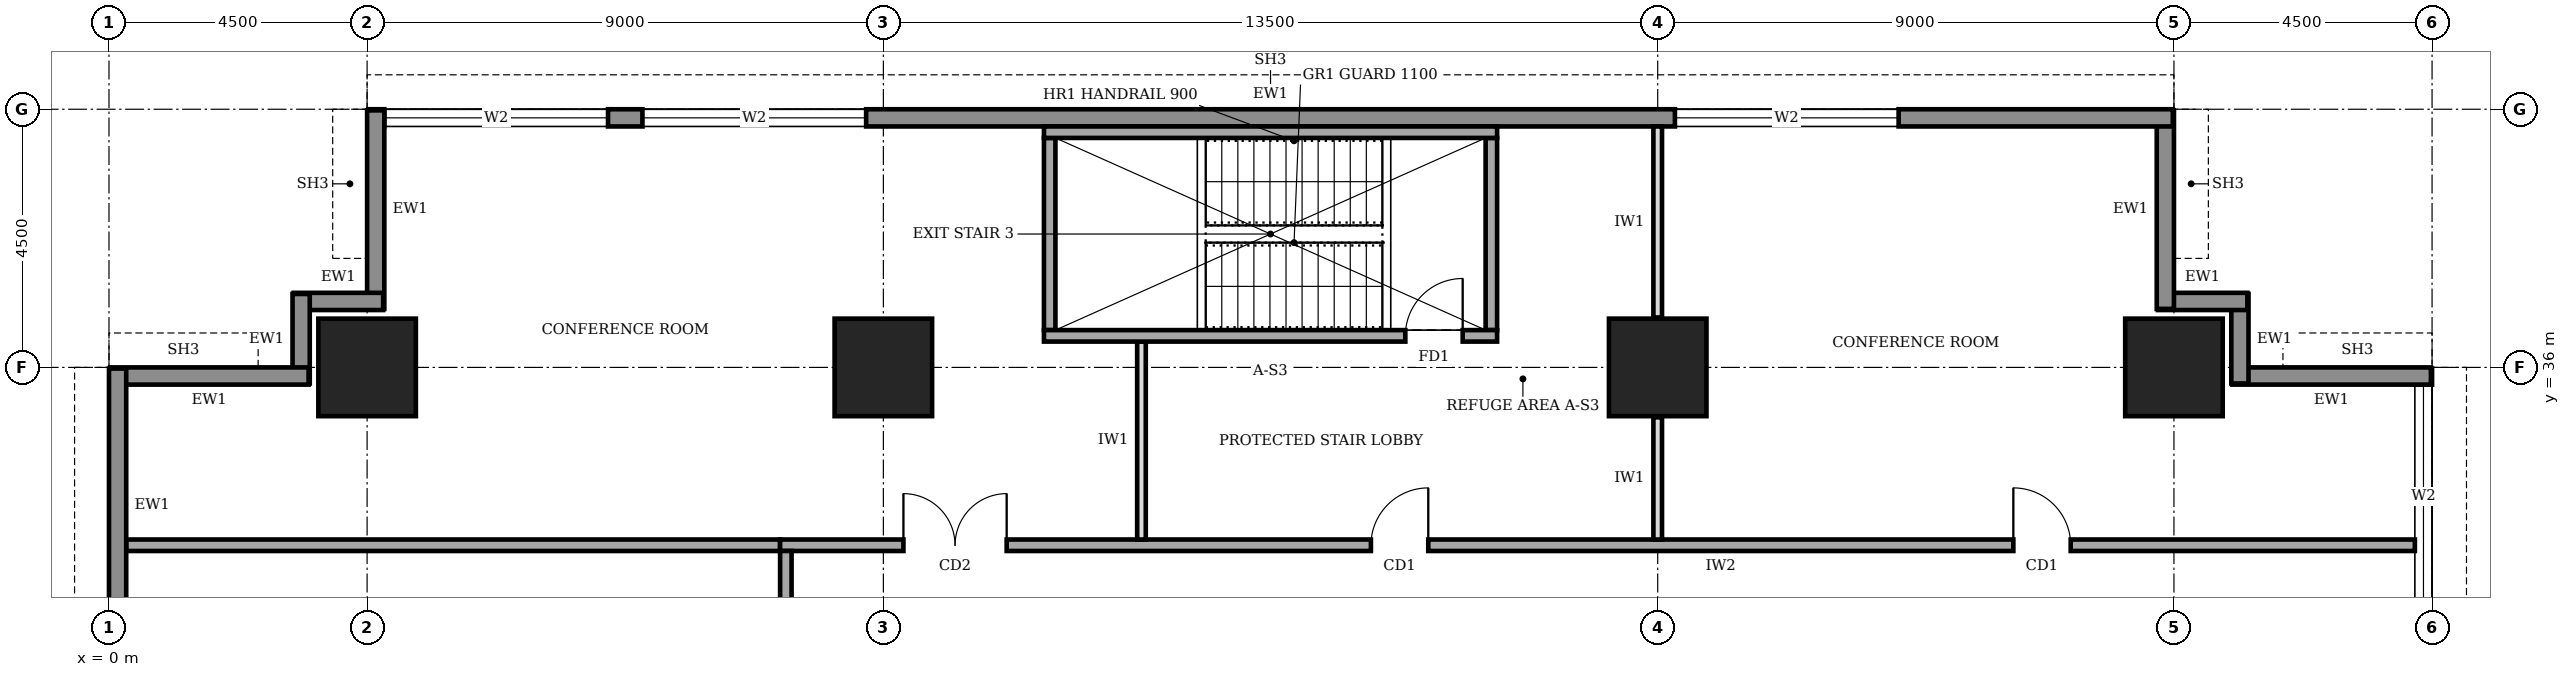
"""IFC4 building model, lengths in metres.
Left out: names, types, materials, properties, quantities, classifications, styles, units other than length and angle.
Written with IfcOpenShell. Run it as: python <this file> out.ifc"""

import sys

from ifc_helpers import new_model, si_unit, direction, frame, frame_2d, origin, origin_2d, place, context, subcontext, project, spatial, rectangle, extrude, element, fill, save


model = new_model("IFC4")
c1 = context("Model", 3, precision=1e-05, world=origin(), true_north=direction((0.0, 1.0)))
c2 = subcontext(c1, "Body", "Model", "MODEL_VIEW")
j1 = project(units=[si_unit("LENGTHUNIT", "METRE"), si_unit("PLANEANGLEUNIT", "RADIAN")], contexts=[c1])
p1 = place(None, origin())
s1 = spatial("IfcSite", under=j1, at=p1, CompositionType="ELEMENT")
p2 = place(p1, origin())
s2 = spatial("IfcBuilding", under=s1, at=p2, CompositionType="ELEMENT")
p3 = place(p2, frame((0.0, 0.0, 157.0)))
s3 = spatial("IfcBuildingStorey", under=s2, at=p3, CompositionType="ELEMENT", Elevation=157.0)
for number, where, z_axis, x_axis in (
    (1, (4.5, 36.0, 0.0), (0.0, 0.0, 1.0), (1.0, 0.0, 0.0)),
    (2, (13.5, 36.0, 0.0), (0.0, 0.0, 1.0), (1.0, 0.0, 0.0)),
    (3, (27.0, 36.0, 0.0), (0.0, 0.0, 1.0), (1.0, 0.0, 0.0)),
    (4, (36.0, 36.0, 0.0), (0.0, 0.0, 1.0), (1.0, 0.0, 0.0)),
):
    element("IfcColumn", number, at=place(p3, frame(where, z_axis=z_axis, x_axis=x_axis)), inside=s3, PredefinedType="COLUMN", context=c2, shape_type="SweptSolid", body=[
        extrude(rectangle(XDim=1.7, YDim=1.7, at=origin_2d()), origin(), (0.0, 0.0, 1.0), 4.0),
    ])
p4 = place(p3, frame((40.35, 4.52, 0.0), z_axis=(0.0, 0.0, 1.0), x_axis=(0.0, 1.0, 0.0)))
e5 = element("IfcWall", 5, at=p4, inside=s3, PredefinedType="STANDARD", context=c2, shape_type="SweptSolid", body=[
    extrude(rectangle(XDim=31.46, YDim=0.3, at=frame_2d((15.73, 0.0))), origin(), (0.0, 0.0, 1.0), 3.75),
])
p5 = place(p4, frame((4.78, 0.0, 0.6)))
e6 = element("IfcOpeningElement", 6, at=p5, cuts=e5, PredefinedType="OPENING", context=c2, shape_type="SweptSolid", body=[
    extrude(rectangle(XDim=3.9, YDim=2.6, at=frame_2d((1.95, 1.3))), frame((0.0, 0.16, 0.0), z_axis=(0.0, -1.0, 0.0), x_axis=(1.0, 0.0, 0.0)), (0.0, 0.0, 1.0), 0.32),
])
p6 = place(p4, frame((9.28, 0.0, 0.6)))
e7 = element("IfcOpeningElement", 7, at=p6, cuts=e5, PredefinedType="OPENING", context=c2, shape_type="SweptSolid", body=[
    extrude(rectangle(XDim=3.9, YDim=2.6, at=frame_2d((1.95, 1.3))), frame((0.0, 0.16, 0.0), z_axis=(0.0, -1.0, 0.0), x_axis=(1.0, 0.0, 0.0)), (0.0, 0.0, 1.0), 0.32),
])
p7 = place(p4, frame((13.78, 0.0, 0.6)))
e8 = element("IfcOpeningElement", 8, at=p7, cuts=e5, PredefinedType="OPENING", context=c2, shape_type="SweptSolid", body=[
    extrude(rectangle(XDim=3.9, YDim=2.6, at=frame_2d((1.95, 1.3))), frame((0.0, 0.16, 0.0), z_axis=(0.0, -1.0, 0.0), x_axis=(1.0, 0.0, 0.0)), (0.0, 0.0, 1.0), 0.32),
])
p8 = place(p4, frame((18.28, 0.0, 0.6)))
e9 = element("IfcOpeningElement", 9, at=p8, cuts=e5, PredefinedType="OPENING", context=c2, shape_type="SweptSolid", body=[
    extrude(rectangle(XDim=3.9, YDim=2.6, at=frame_2d((1.95, 1.3))), frame((0.0, 0.16, 0.0), z_axis=(0.0, -1.0, 0.0), x_axis=(1.0, 0.0, 0.0)), (0.0, 0.0, 1.0), 0.32),
])
p9 = place(p4, frame((22.78, 0.0, 0.6)))
e10 = element("IfcOpeningElement", 10, at=p9, cuts=e5, PredefinedType="OPENING", context=c2, shape_type="SweptSolid", body=[
    extrude(rectangle(XDim=3.9, YDim=2.6, at=frame_2d((1.95, 1.3))), frame((0.0, 0.16, 0.0), z_axis=(0.0, -1.0, 0.0), x_axis=(1.0, 0.0, 0.0)), (0.0, 0.0, 1.0), 0.32),
])
p10 = place(p4, frame((27.28, 0.0, 0.6)))
e11 = element("IfcOpeningElement", 11, at=p10, cuts=e5, PredefinedType="OPENING", context=c2, shape_type="SweptSolid", body=[
    extrude(rectangle(XDim=3.9, YDim=2.6, at=frame_2d((1.95, 1.3))), frame((0.0, 0.16, 0.0), z_axis=(0.0, -1.0, 0.0), x_axis=(1.0, 0.0, 0.0)), (0.0, 0.0, 1.0), 0.32),
])
p11 = place(p3, frame((40.48, 35.85, 0.0), z_axis=(0.0, 0.0, 1.0), x_axis=(-1.0, 0.0, 0.0)))
e12 = element("IfcWall", 12, at=p11, inside=s3, PredefinedType="STANDARD", context=c2, shape_type="SweptSolid", body=[
    extrude(rectangle(XDim=3.46, YDim=0.3, at=frame_2d((1.73, 0.0))), origin(), (0.0, 0.0, 1.0), 2.85),
])
for number, where, z_axis, x_axis in (
    (13, (37.15, 35.72, 0.0), (0.0, 0.0, 1.0), (0.0, 1.0, 0.0)),
    (14, (37.28, 37.15, 0.0), (0.0, 0.0, 1.0), (-1.0, 0.0, 0.0)),
):
    element("IfcWall", number, at=place(p3, frame(where, z_axis=z_axis, x_axis=x_axis)), inside=s3, PredefinedType="STANDARD", context=c2, shape_type="SweptSolid", body=[
        extrude(rectangle(XDim=1.56, YDim=0.3, at=frame_2d((0.78, 0.0))), origin(), (0.0, 0.0, 1.0), 3.75),
    ])
p12 = place(p3, frame((35.85, 37.02, 0.0), z_axis=(0.0, 0.0, 1.0), x_axis=(0.0, 1.0, 0.0)))
e15 = element("IfcWall", 15, at=p12, inside=s3, PredefinedType="STANDARD", context=c2, shape_type="SweptSolid", body=[
    extrude(rectangle(XDim=3.46, YDim=0.3, at=frame_2d((1.73, 0.0))), origin(), (0.0, 0.0, 1.0), 2.85),
])
p13 = place(p3, frame((35.98, 40.35, 0.0), z_axis=(0.0, 0.0, 1.0), x_axis=(-1.0, 0.0, 0.0)))
e16 = element("IfcWall", 16, at=p13, inside=s3, PredefinedType="STANDARD", context=c2, shape_type="SweptSolid", body=[
    extrude(rectangle(XDim=31.46, YDim=0.3, at=frame_2d((15.73, 0.0))), origin(), (0.0, 0.0, 1.0), 3.75),
])
p14 = place(p13, frame((27.28, 0.0, 0.6)))
e17 = element("IfcOpeningElement", 17, at=p14, cuts=e16, PredefinedType="OPENING", context=c2, shape_type="SweptSolid", body=[
    extrude(rectangle(XDim=3.9, YDim=2.6, at=frame_2d((1.95, 1.3))), frame((0.0, 0.16, 0.0), z_axis=(0.0, -1.0, 0.0), x_axis=(1.0, 0.0, 0.0)), (0.0, 0.0, 1.0), 0.32),
])
p15 = place(p13, frame((22.78, 0.0, 0.6)))
e18 = element("IfcOpeningElement", 18, at=p15, cuts=e16, PredefinedType="OPENING", context=c2, shape_type="SweptSolid", body=[
    extrude(rectangle(XDim=3.9, YDim=2.6, at=frame_2d((1.95, 1.3))), frame((0.0, 0.16, 0.0), z_axis=(0.0, -1.0, 0.0), x_axis=(1.0, 0.0, 0.0)), (0.0, 0.0, 1.0), 0.32),
])
p16 = place(p13, frame((4.78, 0.0, 0.6)))
e19 = element("IfcOpeningElement", 19, at=p16, cuts=e16, PredefinedType="OPENING", context=c2, shape_type="SweptSolid", body=[
    extrude(rectangle(XDim=3.9, YDim=2.6, at=frame_2d((1.95, 1.3))), frame((0.0, 0.16, 0.0), z_axis=(0.0, -1.0, 0.0), x_axis=(1.0, 0.0, 0.0)), (0.0, 0.0, 1.0), 0.32),
])
p17 = place(p3, frame((4.65, 40.48, 0.0), z_axis=(0.0, 0.0, 1.0), x_axis=(0.0, -1.0, 0.0)))
e20 = element("IfcWall", 20, at=p17, inside=s3, PredefinedType="STANDARD", context=c2, shape_type="SweptSolid", body=[
    extrude(rectangle(XDim=3.46, YDim=0.3, at=frame_2d((1.73, 0.0))), origin(), (0.0, 0.0, 1.0), 2.85),
])
for number, where, z_axis, x_axis in (
    (21, (4.78, 37.15, 0.0), (0.0, 0.0, 1.0), (-1.0, 0.0, 0.0)),
    (22, (3.35, 37.28, 0.0), (0.0, 0.0, 1.0), (0.0, -1.0, 0.0)),
):
    element("IfcWall", number, at=place(p3, frame(where, z_axis=z_axis, x_axis=x_axis)), inside=s3, PredefinedType="STANDARD", context=c2, shape_type="SweptSolid", body=[
        extrude(rectangle(XDim=1.56, YDim=0.3, at=frame_2d((0.78, 0.0))), origin(), (0.0, 0.0, 1.0), 3.75),
    ])
p18 = place(p3, frame((3.48, 35.85, 0.0), z_axis=(0.0, 0.0, 1.0), x_axis=(-1.0, 0.0, 0.0)))
e23 = element("IfcWall", 23, at=p18, inside=s3, PredefinedType="STANDARD", context=c2, shape_type="SweptSolid", body=[
    extrude(rectangle(XDim=3.46, YDim=0.3, at=frame_2d((1.73, 0.0))), origin(), (0.0, 0.0, 1.0), 2.85),
])
p19 = place(p3, frame((0.15, 35.98, 0.0), z_axis=(0.0, 0.0, 1.0), x_axis=(0.0, -1.0, 0.0)))
e24 = element("IfcWall", 24, at=p19, inside=s3, PredefinedType="STANDARD", context=c2, shape_type="SweptSolid", body=[
    extrude(rectangle(XDim=31.46, YDim=0.3, at=frame_2d((15.73, 0.0))), origin(), (0.0, 0.0, 1.0), 3.75),
])
p20 = place(p19, frame((27.28, 0.0, 0.6)))
e25 = element("IfcOpeningElement", 25, at=p20, cuts=e24, PredefinedType="OPENING", context=c2, shape_type="SweptSolid", body=[
    extrude(rectangle(XDim=3.9, YDim=2.6, at=frame_2d((1.95, 1.3))), frame((0.0, 0.16, 0.0), z_axis=(0.0, -1.0, 0.0), x_axis=(1.0, 0.0, 0.0)), (0.0, 0.0, 1.0), 0.32),
])
p21 = place(p19, frame((22.78, 0.0, 0.6)))
e26 = element("IfcOpeningElement", 26, at=p21, cuts=e24, PredefinedType="OPENING", context=c2, shape_type="SweptSolid", body=[
    extrude(rectangle(XDim=3.9, YDim=2.6, at=frame_2d((1.95, 1.3))), frame((0.0, 0.16, 0.0), z_axis=(0.0, -1.0, 0.0), x_axis=(1.0, 0.0, 0.0)), (0.0, 0.0, 1.0), 0.32),
])
p22 = place(p19, frame((18.28, 0.0, 0.6)))
e27 = element("IfcOpeningElement", 27, at=p22, cuts=e24, PredefinedType="OPENING", context=c2, shape_type="SweptSolid", body=[
    extrude(rectangle(XDim=3.9, YDim=2.6, at=frame_2d((1.95, 1.3))), frame((0.0, 0.16, 0.0), z_axis=(0.0, -1.0, 0.0), x_axis=(1.0, 0.0, 0.0)), (0.0, 0.0, 1.0), 0.32),
])
p23 = place(p19, frame((13.78, 0.0, 0.6)))
e28 = element("IfcOpeningElement", 28, at=p23, cuts=e24, PredefinedType="OPENING", context=c2, shape_type="SweptSolid", body=[
    extrude(rectangle(XDim=3.9, YDim=2.6, at=frame_2d((1.95, 1.3))), frame((0.0, 0.16, 0.0), z_axis=(0.0, -1.0, 0.0), x_axis=(1.0, 0.0, 0.0)), (0.0, 0.0, 1.0), 0.32),
])
p24 = place(p19, frame((9.28, 0.0, 0.6)))
e29 = element("IfcOpeningElement", 29, at=p24, cuts=e24, PredefinedType="OPENING", context=c2, shape_type="SweptSolid", body=[
    extrude(rectangle(XDim=3.9, YDim=2.6, at=frame_2d((1.95, 1.3))), frame((0.0, 0.16, 0.0), z_axis=(0.0, -1.0, 0.0), x_axis=(1.0, 0.0, 0.0)), (0.0, 0.0, 1.0), 0.32),
])
p25 = place(p19, frame((4.78, 0.0, 0.6)))
e30 = element("IfcOpeningElement", 30, at=p25, cuts=e24, PredefinedType="OPENING", context=c2, shape_type="SweptSolid", body=[
    extrude(rectangle(XDim=3.9, YDim=2.6, at=frame_2d((1.95, 1.3))), frame((0.0, 0.16, 0.0), z_axis=(0.0, -1.0, 0.0), x_axis=(1.0, 0.0, 0.0)), (0.0, 0.0, 1.0), 0.32),
])
p26 = place(p3, frame((40.2, 32.9, 0.0), z_axis=(0.0, 0.0, 1.0), x_axis=(-1.0, 0.0, 0.0)))
e31 = element("IfcWall", 31, at=p26, inside=s3, PredefinedType="SOLIDWALL", context=c2, shape_type="SweptSolid", body=[
    extrude(rectangle(XDim=28.5, YDim=0.2, at=frame_2d((14.25, 0.0))), origin(), (0.0, 0.0, 1.0), 3.75),
])
p27 = place(p26, frame((24.55, 0.0, 0.0)))
e32 = element("IfcOpeningElement", 32, at=p27, cuts=e31, PredefinedType="OPENING", context=c2, shape_type="SweptSolid", body=[
    extrude(rectangle(XDim=1.8, YDim=2.1, at=frame_2d((0.9, 1.05))), frame((0.0, 0.11, 0.0), z_axis=(0.0, -1.0, 0.0), x_axis=(1.0, 0.0, 0.0)), (0.0, 0.0, 1.0), 0.22),
])
p28 = place(p26, frame((17.2, 0.0, 0.0)))
e33 = element("IfcOpeningElement", 33, at=p28, cuts=e31, PredefinedType="OPENING", context=c2, shape_type="SweptSolid", body=[
    extrude(rectangle(XDim=1.0, YDim=2.1, at=frame_2d((0.5, 1.05))), frame((0.0, 0.11, 0.0), z_axis=(0.0, -1.0, 0.0), x_axis=(1.0, 0.0, 0.0)), (0.0, 0.0, 1.0), 0.22),
])
p29 = place(p26, frame((6.0, 0.0, 0.0)))
e34 = element("IfcOpeningElement", 34, at=p29, cuts=e31, PredefinedType="OPENING", context=c2, shape_type="SweptSolid", body=[
    extrude(rectangle(XDim=1.0, YDim=2.1, at=frame_2d((0.5, 1.05))), frame((0.0, 0.11, 0.0), z_axis=(0.0, -1.0, 0.0), x_axis=(1.0, 0.0, 0.0)), (0.0, 0.0, 1.0), 0.22),
])
p30 = place(p3, frame((11.8, 32.8, 0.0), z_axis=(0.0, 0.0, 1.0), x_axis=(0.0, -1.0, 0.0)))
e35 = element("IfcWall", 35, at=p30, inside=s3, PredefinedType="SOLIDWALL", context=c2, shape_type="SweptSolid", body=[
    extrude(rectangle(XDim=25.3, YDim=0.2, at=frame_2d((12.65, 0.0))), origin(), (0.0, 0.0, 1.0), 3.75),
])
p31 = place(p30, frame((21.8, 0.0, 0.0)))
e36 = element("IfcOpeningElement", 36, at=p31, cuts=e35, PredefinedType="OPENING", context=c2, shape_type="SweptSolid", body=[
    extrude(rectangle(XDim=1.0, YDim=2.1, at=frame_2d((0.5, 1.05))), frame((0.0, 0.11, 0.0), z_axis=(0.0, -1.0, 0.0), x_axis=(1.0, 0.0, 0.0)), (0.0, 0.0, 1.0), 0.22),
])
p32 = place(p30, frame((17.7, 0.0, 0.0)))
e37 = element("IfcOpeningElement", 37, at=p32, cuts=e35, PredefinedType="OPENING", context=c2, shape_type="SweptSolid", body=[
    extrude(rectangle(XDim=1.0, YDim=2.1, at=frame_2d((0.5, 1.05))), frame((0.0, 0.11, 0.0), z_axis=(0.0, -1.0, 0.0), x_axis=(1.0, 0.0, 0.0)), (0.0, 0.0, 1.0), 0.22),
])
p33 = place(p30, frame((14.7, 0.0, 0.0)))
e38 = element("IfcOpeningElement", 38, at=p33, cuts=e35, PredefinedType="OPENING", context=c2, shape_type="SweptSolid", body=[
    extrude(rectangle(XDim=0.9, YDim=2.1, at=frame_2d((0.45, 1.05))), frame((0.0, 0.11, 0.0), z_axis=(0.0, -1.0, 0.0), x_axis=(1.0, 0.0, 0.0)), (0.0, 0.0, 1.0), 0.22),
])
p34 = place(p30, frame((11.65, 0.0, 0.0)))
e39 = element("IfcOpeningElement", 39, at=p34, cuts=e35, PredefinedType="OPENING", context=c2, shape_type="SweptSolid", body=[
    extrude(rectangle(XDim=0.9, YDim=2.1, at=frame_2d((0.45, 1.05))), frame((0.0, 0.11, 0.0), z_axis=(0.0, -1.0, 0.0), x_axis=(1.0, 0.0, 0.0)), (0.0, 0.0, 1.0), 0.22),
])
p35 = place(p30, frame((6.95, 0.0, 0.0)))
e40 = element("IfcOpeningElement", 40, at=p35, cuts=e35, PredefinedType="OPENING", context=c2, shape_type="SweptSolid", body=[
    extrude(rectangle(XDim=0.9, YDim=2.1, at=frame_2d((0.45, 1.05))), frame((0.0, 0.11, 0.0), z_axis=(0.0, -1.0, 0.0), x_axis=(1.0, 0.0, 0.0)), (0.0, 0.0, 1.0), 0.22),
])
p36 = place(p30, frame((9.5, 0.0, 0.0)))
e41 = element("IfcOpeningElement", 41, at=p36, cuts=e35, PredefinedType="OPENING", context=c2, shape_type="SweptSolid", body=[
    extrude(rectangle(XDim=1.0, YDim=2.1, at=frame_2d((0.5, 1.05))), frame((0.0, 0.11, 0.0), z_axis=(0.0, -1.0, 0.0), x_axis=(1.0, 0.0, 0.0)), (0.0, 0.0, 1.0), 0.22),
])
p37 = place(p30, frame((2.3, 0.0, 0.0)))
e42 = element("IfcOpeningElement", 42, at=p37, cuts=e35, PredefinedType="OPENING", context=c2, shape_type="SweptSolid", body=[
    extrude(rectangle(XDim=1.0, YDim=2.1, at=frame_2d((0.5, 1.05))), frame((0.0, 0.11, 0.0), z_axis=(0.0, -1.0, 0.0), x_axis=(1.0, 0.0, 0.0)), (0.0, 0.0, 1.0), 0.22),
])
p38 = place(p3, frame((0.3, 32.9, 0.0), z_axis=(0.0, 0.0, 1.0), x_axis=(1.0, 0.0, 0.0)))
e43 = element("IfcWall", 43, at=p38, inside=s3, PredefinedType="SOLIDWALL", context=c2, shape_type="SweptSolid", body=[
    extrude(rectangle(XDim=11.4, YDim=0.2, at=frame_2d((5.7, 0.0))), origin(), (0.0, 0.0, 1.0), 3.75),
])
p39 = place(p3, frame((18.0, 33.0, 0.0), z_axis=(0.0, 0.0, 1.0), x_axis=(0.0, 1.0, 0.0)))
e44 = element("IfcWall", 44, at=p39, inside=s3, PredefinedType="PARTITIONING", context=c2, shape_type="SweptSolid", body=[
    extrude(rectangle(XDim=3.45, YDim=0.15, at=frame_2d((1.725, 0.0))), origin(), (0.0, 0.0, 1.0), 3.75),
])
p40 = place(p3, frame((27.0, 33.0, 0.0), z_axis=(0.0, 0.0, 1.0), x_axis=(0.0, 1.0, 0.0)))
e45 = element("IfcWall", 45, at=p40, inside=s3, PredefinedType="PARTITIONING", context=c2, shape_type="SweptSolid", body=[
    extrude(rectangle(XDim=2.13, YDim=0.15, at=frame_2d((1.065, 0.0))), origin(), (0.0, 0.0, 1.0), 2.85),
])
p41 = place(p3, frame((27.0, 36.87, 0.0), z_axis=(0.0, 0.0, 1.0), x_axis=(0.0, 1.0, 0.0)))
e46 = element("IfcWall", 46, at=p41, inside=s3, PredefinedType="PARTITIONING", context=c2, shape_type="SweptSolid", body=[
    extrude(rectangle(XDim=3.33, YDim=0.15, at=frame_2d((1.665, 0.0))), origin(), (0.0, 0.0, 1.0), 2.85),
])
p42 = place(p3, frame((16.3, 36.55, 0.0), z_axis=(0.0, 0.0, 1.0), x_axis=(1.0, 0.0, 0.0)))
e47 = element("IfcWall", 47, at=p42, inside=s3, PredefinedType="SOLIDWALL", context=c2, shape_type="SweptSolid", body=[
    extrude(rectangle(XDim=7.9, YDim=0.2, at=frame_2d((3.95, 0.0))), origin(), (0.0, 0.0, 1.0), 3.75),
])
p43 = place(p42, frame((6.3, 0.0, 0.0)))
e48 = element("IfcOpeningElement", 48, at=p43, cuts=e47, PredefinedType="OPENING", context=c2, shape_type="SweptSolid", body=[
    extrude(rectangle(XDim=1.0, YDim=2.1, at=frame_2d((0.5, 1.05))), frame((0.0, 0.11, 0.0), z_axis=(0.0, -1.0, 0.0), x_axis=(1.0, 0.0, 0.0)), (0.0, 0.0, 1.0), 0.22),
])
p44 = place(p3, frame((16.3, 40.1, 0.0), z_axis=(0.0, 0.0, 1.0), x_axis=(1.0, 0.0, 0.0)))
e49 = element("IfcWall", 49, at=p44, inside=s3, PredefinedType="SOLIDWALL", context=c2, shape_type="SweptSolid", body=[
    extrude(rectangle(XDim=7.9, YDim=0.2, at=frame_2d((3.95, 0.0))), origin(), (0.0, 0.0, 1.0), 3.75),
])
for number, where, z_axis, x_axis in (
    (50, (16.4, 36.65, 0.0), (0.0, 0.0, 1.0), (0.0, 1.0, 0.0)),
    (51, (24.1, 36.65, 0.0), (0.0, 0.0, 1.0), (0.0, 1.0, 0.0)),
):
    element("IfcWall", number, at=place(p3, frame(where, z_axis=z_axis, x_axis=x_axis)), inside=s3, PredefinedType="SOLIDWALL", context=c2, shape_type="SweptSolid", body=[
        extrude(rectangle(XDim=3.35, YDim=0.2, at=frame_2d((1.675, 0.0))), origin(), (0.0, 0.0, 1.0), 3.75),
    ])
p45 = place(p10, origin())
e52 = element("IfcWindow", 52, at=p45, inside=s3, PartitioningType="SINGLE_PANEL", PredefinedType="WINDOW", context=c2, shape_type="SweptSolid", body=[
    extrude(rectangle(XDim=3.9, YDim=2.6, at=frame_2d((1.95, 1.3))), frame((0.0, 0.03, 0.0), z_axis=(0.0, -1.0, 0.0), x_axis=(1.0, 0.0, 0.0)), (0.0, 0.0, 1.0), 0.06),
])
fill(e11, e52)
p46 = place(p14, origin())
e53 = element("IfcWindow", 53, at=p46, inside=s3, PartitioningType="SINGLE_PANEL", PredefinedType="WINDOW", context=c2, shape_type="SweptSolid", body=[
    extrude(rectangle(XDim=3.9, YDim=2.6, at=frame_2d((1.95, 1.3))), frame((0.0, 0.03, 0.0), z_axis=(0.0, -1.0, 0.0), x_axis=(1.0, 0.0, 0.0)), (0.0, 0.0, 1.0), 0.06),
])
fill(e17, e53)
p47 = place(p15, origin())
e54 = element("IfcWindow", 54, at=p47, inside=s3, PartitioningType="SINGLE_PANEL", PredefinedType="WINDOW", context=c2, shape_type="SweptSolid", body=[
    extrude(rectangle(XDim=3.9, YDim=2.6, at=frame_2d((1.95, 1.3))), frame((0.0, 0.03, 0.0), z_axis=(0.0, -1.0, 0.0), x_axis=(1.0, 0.0, 0.0)), (0.0, 0.0, 1.0), 0.06),
])
fill(e18, e54)
p48 = place(p16, origin())
e55 = element("IfcWindow", 55, at=p48, inside=s3, PartitioningType="SINGLE_PANEL", PredefinedType="WINDOW", context=c2, shape_type="SweptSolid", body=[
    extrude(rectangle(XDim=3.9, YDim=2.6, at=frame_2d((1.95, 1.3))), frame((0.0, 0.03, 0.0), z_axis=(0.0, -1.0, 0.0), x_axis=(1.0, 0.0, 0.0)), (0.0, 0.0, 1.0), 0.06),
])
fill(e19, e55)
p49 = place(p27, frame((1.8, 0.0, 0.0), z_axis=(0.0, 0.0, 1.0), x_axis=(-1.0, 0.0, 0.0)))
e56 = element("IfcDoor", 56, at=p49, inside=s3, OperationType="DOUBLE_DOOR_SINGLE_SWING", PredefinedType="DOOR", context=c2, shape_type="SweptSolid", body=[
    extrude(rectangle(XDim=1.8, YDim=2.1, at=frame_2d((0.9, 1.05))), frame((0.0, 0.025, 0.0), z_axis=(0.0, -1.0, 0.0), x_axis=(1.0, 0.0, 0.0)), (0.0, 0.0, 1.0), 0.05),
])
fill(e32, e56)
p50 = place(p28, frame((1.0, 0.0, 0.0), z_axis=(0.0, 0.0, 1.0), x_axis=(-1.0, 0.0, 0.0)))
e57 = element("IfcDoor", 57, at=p50, inside=s3, OperationType="SINGLE_SWING_RIGHT", PredefinedType="DOOR", context=c2, shape_type="SweptSolid", body=[
    extrude(rectangle(XDim=1.0, YDim=2.1, at=frame_2d((0.5, 1.05))), frame((0.0, 0.025, 0.0), z_axis=(0.0, -1.0, 0.0), x_axis=(1.0, 0.0, 0.0)), (0.0, 0.0, 1.0), 0.05),
])
fill(e33, e57)
p51 = place(p29, frame((1.0, 0.0, 0.0), z_axis=(0.0, 0.0, 1.0), x_axis=(-1.0, 0.0, 0.0)))
e58 = element("IfcDoor", 58, at=p51, inside=s3, OperationType="SINGLE_SWING_LEFT", PredefinedType="DOOR", context=c2, shape_type="SweptSolid", body=[
    extrude(rectangle(XDim=1.0, YDim=2.1, at=frame_2d((0.5, 1.05))), frame((0.0, 0.025, 0.0), z_axis=(0.0, -1.0, 0.0), x_axis=(1.0, 0.0, 0.0)), (0.0, 0.0, 1.0), 0.05),
])
fill(e34, e58)
p52 = place(p43, origin())
e59 = element("IfcDoor", 59, at=p52, inside=s3, OperationType="SINGLE_SWING_RIGHT", PredefinedType="DOOR", context=c2, shape_type="SweptSolid", body=[
    extrude(rectangle(XDim=1.0, YDim=2.1, at=frame_2d((0.5, 1.05))), frame((0.0, 0.025, 0.0), z_axis=(0.0, -1.0, 0.0), x_axis=(1.0, 0.0, 0.0)), (0.0, 0.0, 1.0), 0.05),
])
fill(e48, e59)
save(model, sys.argv[1])
